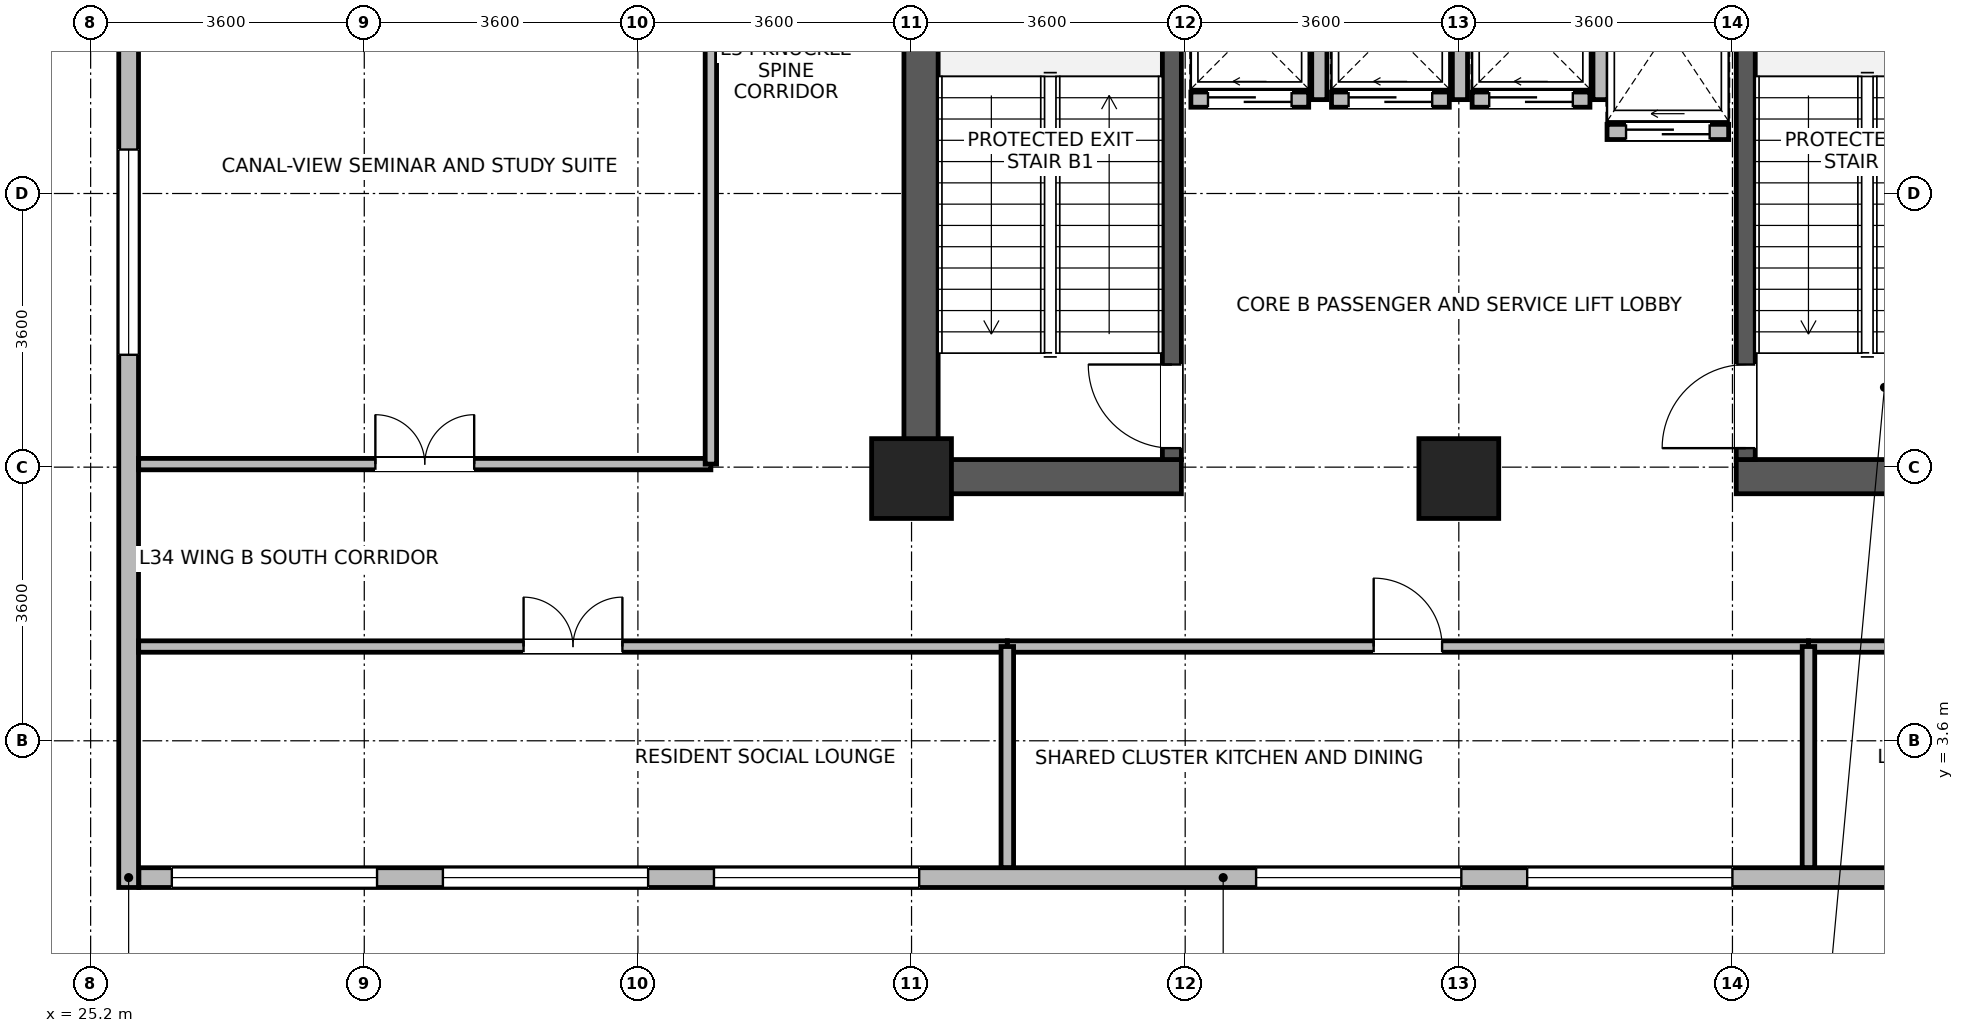
"""IFC4 building model, lengths in metres.
Left out: names, types, materials, properties, quantities, classifications, styles, units other than length and angle.
Written with IfcOpenShell. Run it as: python <this file> out.ifc"""

import sys

from ifc_helpers import new_model, si_unit, direction, frame, frame_2d, origin, origin_2d, place, context, subcontext, project, spatial, rectangle, extrude, source, transform, mapped, element, fill, save


model = new_model("IFC4")
c1 = context("Model", 3, precision=1e-05, world=origin(), true_north=direction((0.0, 1.0)))
c2 = subcontext(c1, "Body", "Model", "MODEL_VIEW")
j1 = project(units=[si_unit("LENGTHUNIT", "METRE"), si_unit("PLANEANGLEUNIT", "RADIAN")], contexts=[c1])
p1 = place(None, origin())
s1 = spatial("IfcSite", under=j1, at=p1, CompositionType="ELEMENT")
p2 = place(p1, origin())
s2 = spatial("IfcBuilding", under=s1, at=p2, CompositionType="ELEMENT")
p3 = place(p2, frame((0.0, 0.0, 135.6)))
s3 = spatial("IfcBuildingStorey", under=s2, at=p3, CompositionType="ELEMENT", Elevation=135.6)
p4 = place(p3, frame((36.125, 6.85, 0.0), z_axis=(0.0, 0.0, 1.0), x_axis=(0.0, 1.0, 0.0)))
e1 = element("IfcWall", 1, at=p4, inside=s3, PredefinedType="SHEAR", context=c2, shape_type="SweptSolid", body=[
    extrude(rectangle(XDim=7.9, YDim=0.45, at=frame_2d((3.95, 0.0))), origin(), (0.0, 0.0, 1.0), 4.36),
])
for number, where, z_axis, x_axis in (
    (2, (36.35, 7.075, 0.0), (0.0, 0.0, 1.0), (1.0, 0.0, 0.0)),
    (3, (46.85, 7.075, 0.0), (0.0, 0.0, 1.0), (1.0, 0.0, 0.0)),
):
    element("IfcWall", number, at=place(p3, frame(where, z_axis=z_axis, x_axis=x_axis)), inside=s3, PredefinedType="SHEAR", context=c2, shape_type="SweptSolid", body=[
        extrude(rectangle(XDim=3.2, YDim=0.45, at=frame_2d((1.6, 0.0))), origin(), (0.0, 0.0, 1.0), 4.36),
    ])
p5 = place(p3, frame((39.425, 7.3, 0.0), z_axis=(0.0, 0.0, 1.0), x_axis=(0.0, 1.0, 0.0)))
e4 = element("IfcWall", 4, at=p5, inside=s3, PredefinedType="SHEAR", context=c2, shape_type="SweptSolid", body=[
    extrude(rectangle(XDim=7.0, YDim=0.25, at=frame_2d((3.5, 0.0))), origin(), (0.0, 0.0, 1.0), 4.36),
])
p6 = place(p5, frame((0.15, 0.0, 0.0)))
e5 = element("IfcOpeningElement", 5, at=p6, cuts=e4, PredefinedType="OPENING", context=c2, shape_type="SweptSolid", body=[
    extrude(rectangle(XDim=1.1, YDim=2.08, at=frame_2d((0.55, 1.04))), frame((0.0, 0.135, 0.0), z_axis=(0.0, -1.0, 0.0), x_axis=(1.0, 0.0, 0.0)), (0.0, 0.0, 1.0), 0.27),
])
p7 = place(p3, frame((46.975, 7.3, 0.0), z_axis=(0.0, 0.0, 1.0), x_axis=(0.0, 1.0, 0.0)))
e6 = element("IfcWall", 6, at=p7, inside=s3, PredefinedType="SHEAR", context=c2, shape_type="SweptSolid", body=[
    extrude(rectangle(XDim=7.0, YDim=0.25, at=frame_2d((3.5, 0.0))), origin(), (0.0, 0.0, 1.0), 4.36),
])
p8 = place(p7, frame((0.15, 0.0, 0.0)))
e7 = element("IfcOpeningElement", 7, at=p8, cuts=e6, PredefinedType="OPENING", context=c2, shape_type="SweptSolid", body=[
    extrude(rectangle(XDim=1.1, YDim=2.08, at=frame_2d((0.55, 1.04))), frame((0.0, 0.135, 0.0), z_axis=(0.0, -1.0, 0.0), x_axis=(1.0, 0.0, 0.0)), (0.0, 0.0, 1.0), 0.27),
])
m1 = source(origin(), c2, "Body", "SweptSolid", [
    extrude(rectangle(XDim=1.05, YDim=1.05, at=origin_2d()), origin(), (0.0, 0.0, 1.0), 4.6),
])
for number, where, z_axis, x_axis in (
    (8, (36.0, 7.05, 0.0), (0.0, 0.0, 1.0), (1.0, 0.0, 0.0)),
    (9, (43.2, 7.05, 0.0), (0.0, 0.0, 1.0), (1.0, 0.0, 0.0)),
):
    element("IfcColumn", number, at=place(p3, frame(where, z_axis=z_axis, x_axis=x_axis)), inside=s3, PredefinedType="COLUMN", context=c2, shape_type="MappedRepresentation", body=[
        mapped(m1, transform((0.0, 0.0, 0.0), x_axis=(1.0, 0.0, 0.0), y_axis=(0.0, 1.0, 0.0), z_axis=(0.0, 0.0, 1.0), scale=1.0)),
    ])
p9 = place(p3, frame((54.365, 1.8, 0.0), z_axis=(0.0, 0.0, 1.0), x_axis=(-1.0, 0.0, 0.0)))
e10 = element("IfcWall", 10, at=p9, inside=s3, PredefinedType="STANDARD", context=c2, shape_type="SweptSolid", body=[
    extrude(rectangle(XDim=28.53, YDim=0.26, at=frame_2d((14.265, 0.0))), origin(), (0.0, 0.0, 1.0), 4.34),
])
p10 = place(p9, frame((0.433, 0.0, 0.85)))
e11 = element("IfcOpeningElement", 11, at=p10, cuts=e10, PredefinedType="OPENING", context=c2, shape_type="SweptSolid", body=[
    extrude(rectangle(XDim=2.7, YDim=2.05, at=frame_2d((1.35, 1.025))), frame((0.0, 0.14, 0.0), z_axis=(0.0, -1.0, 0.0), x_axis=(1.0, 0.0, 0.0)), (0.0, 0.0, 1.0), 0.28),
])
p11 = place(p9, frame((7.566, 0.0, 0.85)))
e12 = element("IfcOpeningElement", 12, at=p11, cuts=e10, PredefinedType="OPENING", context=c2, shape_type="SweptSolid", body=[
    extrude(rectangle(XDim=2.7, YDim=2.05, at=frame_2d((1.35, 1.025))), frame((0.0, 0.14, 0.0), z_axis=(0.0, -1.0, 0.0), x_axis=(1.0, 0.0, 0.0)), (0.0, 0.0, 1.0), 0.28),
])
p12 = place(p9, frame((11.132, 0.0, 0.85)))
e13 = element("IfcOpeningElement", 13, at=p12, cuts=e10, PredefinedType="OPENING", context=c2, shape_type="SweptSolid", body=[
    extrude(rectangle(XDim=2.7, YDim=2.05, at=frame_2d((1.35, 1.025))), frame((0.0, 0.14, 0.0), z_axis=(0.0, -1.0, 0.0), x_axis=(1.0, 0.0, 0.0)), (0.0, 0.0, 1.0), 0.28),
])
p13 = place(p9, frame((18.264, 0.0, 0.85)))
e14 = element("IfcOpeningElement", 14, at=p13, cuts=e10, PredefinedType="OPENING", context=c2, shape_type="SweptSolid", body=[
    extrude(rectangle(XDim=2.7, YDim=2.05, at=frame_2d((1.35, 1.025))), frame((0.0, 0.14, 0.0), z_axis=(0.0, -1.0, 0.0), x_axis=(1.0, 0.0, 0.0)), (0.0, 0.0, 1.0), 0.28),
])
p14 = place(p9, frame((21.831, 0.0, 0.85)))
e15 = element("IfcOpeningElement", 15, at=p14, cuts=e10, PredefinedType="OPENING", context=c2, shape_type="SweptSolid", body=[
    extrude(rectangle(XDim=2.7, YDim=2.05, at=frame_2d((1.35, 1.025))), frame((0.0, 0.14, 0.0), z_axis=(0.0, -1.0, 0.0), x_axis=(1.0, 0.0, 0.0)), (0.0, 0.0, 1.0), 0.28),
])
p15 = place(p9, frame((25.397, 0.0, 0.85)))
e16 = element("IfcOpeningElement", 16, at=p15, cuts=e10, PredefinedType="OPENING", context=c2, shape_type="SweptSolid", body=[
    extrude(rectangle(XDim=2.7, YDim=2.05, at=frame_2d((1.35, 1.025))), frame((0.0, 0.14, 0.0), z_axis=(0.0, -1.0, 0.0), x_axis=(1.0, 0.0, 0.0)), (0.0, 0.0, 1.0), 0.28),
])
p16 = place(p3, frame((25.7, 1.67, 0.0), z_axis=(0.0, 0.0, 1.0), x_axis=(0.0, 1.0, 0.0)))
e17 = element("IfcWall", 17, at=p16, inside=s3, PredefinedType="STANDARD", context=c2, shape_type="SweptSolid", body=[
    extrude(rectangle(XDim=20.06, YDim=0.26, at=frame_2d((10.03, 0.0))), origin(), (0.0, 0.0, 1.0), 4.34),
])
p17 = place(p16, frame((7.008, 0.0, 0.85)))
e18 = element("IfcOpeningElement", 18, at=p17, cuts=e17, PredefinedType="OPENING", context=c2, shape_type="SweptSolid", body=[
    extrude(rectangle(XDim=2.7, YDim=2.05, at=frame_2d((1.35, 1.025))), frame((0.0, 0.14, 0.0), z_axis=(0.0, -1.0, 0.0), x_axis=(1.0, 0.0, 0.0)), (0.0, 0.0, 1.0), 0.28),
])
p18 = place(p16, frame((13.695, 0.0, 0.85)))
e19 = element("IfcOpeningElement", 19, at=p18, cuts=e17, PredefinedType="OPENING", context=c2, shape_type="SweptSolid", body=[
    extrude(rectangle(XDim=2.7, YDim=2.05, at=frame_2d((1.35, 1.025))), frame((0.0, 0.14, 0.0), z_axis=(0.0, -1.0, 0.0), x_axis=(1.0, 0.0, 0.0)), (0.0, 0.0, 1.0), 0.28),
])
p19 = place(p3, frame((39.675, 12.035, 0.0), z_axis=(0.0, 0.0, 1.0), x_axis=(1.0, 0.0, 0.0)))
e20 = element("IfcWall", 20, at=p19, inside=s3, PredefinedType="PARTITIONING", context=c2, shape_type="SweptSolid", body=[
    extrude(rectangle(XDim=1.55, YDim=0.2, at=frame_2d((0.775, 0.0))), origin(), (0.0, 0.0, 1.0), 4.34),
])
p20 = place(p19, frame((0.225, 0.0, 0.0)))
e21 = element("IfcOpeningElement", 21, at=p20, cuts=e20, PredefinedType="OPENING", context=c2, shape_type="SweptSolid", body=[
    extrude(rectangle(XDim=1.1, YDim=2.12, at=frame_2d((0.55, 1.06))), frame((0.0, 0.11, 0.0), z_axis=(0.0, -1.0, 0.0), x_axis=(1.0, 0.0, 0.0)), (0.0, 0.0, 1.0), 0.22),
])
p21 = place(p3, frame((41.365, 12.035, 0.0), z_axis=(0.0, 0.0, 1.0), x_axis=(0.0, 1.0, 0.0)))
e22 = element("IfcWall", 22, at=p21, inside=s3, PredefinedType="PARTITIONING", context=c2, shape_type="SweptSolid", body=[
    extrude(rectangle(XDim=1.83, YDim=0.2, at=frame_2d((0.915, 0.0))), origin(), (0.0, 0.0, 1.0), 4.34),
])
p22 = place(p3, frame((41.525, 12.035, 0.0), z_axis=(0.0, 0.0, 1.0), x_axis=(1.0, 0.0, 0.0)))
e23 = element("IfcWall", 23, at=p22, inside=s3, PredefinedType="PARTITIONING", context=c2, shape_type="SweptSolid", body=[
    extrude(rectangle(XDim=1.55, YDim=0.2, at=frame_2d((0.775, 0.0))), origin(), (0.0, 0.0, 1.0), 4.34),
])
p23 = place(p22, frame((0.225, 0.0, 0.0)))
e24 = element("IfcOpeningElement", 24, at=p23, cuts=e23, PredefinedType="OPENING", context=c2, shape_type="SweptSolid", body=[
    extrude(rectangle(XDim=1.1, YDim=2.12, at=frame_2d((0.55, 1.06))), frame((0.0, 0.11, 0.0), z_axis=(0.0, -1.0, 0.0), x_axis=(1.0, 0.0, 0.0)), (0.0, 0.0, 1.0), 0.22),
])
p24 = place(p3, frame((43.215, 12.035, 0.0), z_axis=(0.0, 0.0, 1.0), x_axis=(0.0, 1.0, 0.0)))
e25 = element("IfcWall", 25, at=p24, inside=s3, PredefinedType="PARTITIONING", context=c2, shape_type="SweptSolid", body=[
    extrude(rectangle(XDim=1.83, YDim=0.2, at=frame_2d((0.915, 0.0))), origin(), (0.0, 0.0, 1.0), 4.34),
])
p25 = place(p3, frame((43.375, 12.035, 0.0), z_axis=(0.0, 0.0, 1.0), x_axis=(1.0, 0.0, 0.0)))
e26 = element("IfcWall", 26, at=p25, inside=s3, PredefinedType="PARTITIONING", context=c2, shape_type="SweptSolid", body=[
    extrude(rectangle(XDim=1.55, YDim=0.2, at=frame_2d((0.775, 0.0))), origin(), (0.0, 0.0, 1.0), 4.34),
])
p26 = place(p25, frame((0.225, 0.0, 0.0)))
e27 = element("IfcOpeningElement", 27, at=p26, cuts=e26, PredefinedType="OPENING", context=c2, shape_type="SweptSolid", body=[
    extrude(rectangle(XDim=1.1, YDim=2.12, at=frame_2d((0.55, 1.06))), frame((0.0, 0.11, 0.0), z_axis=(0.0, -1.0, 0.0), x_axis=(1.0, 0.0, 0.0)), (0.0, 0.0, 1.0), 0.22),
])
p27 = place(p3, frame((45.065, 12.035, 0.0), z_axis=(0.0, 0.0, 1.0), x_axis=(0.0, 1.0, 0.0)))
e28 = element("IfcWall", 28, at=p27, inside=s3, PredefinedType="PARTITIONING", context=c2, shape_type="SweptSolid", body=[
    extrude(rectangle(XDim=1.83, YDim=0.2, at=frame_2d((0.915, 0.0))), origin(), (0.0, 0.0, 1.0), 4.34),
])
p28 = place(p3, frame((45.15, 11.61, 0.0), z_axis=(0.0, 0.0, 1.0), x_axis=(1.0, 0.0, 0.0)))
e29 = element("IfcWall", 29, at=p28, inside=s3, PredefinedType="PARTITIONING", context=c2, shape_type="SweptSolid", body=[
    extrude(rectangle(XDim=1.6, YDim=0.2, at=frame_2d((0.8, 0.0))), origin(), (0.0, 0.0, 1.0), 4.34),
])
p29 = place(p28, frame((0.25, 0.0, 0.0)))
e30 = element("IfcOpeningElement", 30, at=p29, cuts=e29, PredefinedType="OPENING", context=c2, shape_type="SweptSolid", body=[
    extrude(rectangle(XDim=1.1, YDim=2.12, at=frame_2d((0.55, 1.06))), frame((0.0, 0.11, 0.0), z_axis=(0.0, -1.0, 0.0), x_axis=(1.0, 0.0, 0.0)), (0.0, 0.0, 1.0), 0.22),
])
p30 = place(p3, frame((25.832, 4.84, 0.0), z_axis=(0.0, 0.0, 1.0), x_axis=(1.0, 0.0, 0.0)))
e31 = element("IfcWall", 31, at=p30, inside=s3, PredefinedType="PARTITIONING", context=c2, shape_type="SweptSolid", body=[
    extrude(rectangle(XDim=11.428, YDim=0.15, at=frame_2d((5.714, 0.0))), origin(), (0.0, 0.0, 1.0), 4.34),
])
p31 = place(p30, frame((5.064, 0.0, 0.0)))
e32 = element("IfcOpeningElement", 32, at=p31, cuts=e31, PredefinedType="OPENING", context=c2, shape_type="SweptSolid", body=[
    extrude(rectangle(XDim=1.3, YDim=2.12, at=frame_2d((0.65, 1.06))), frame((0.0, 0.085, 0.0), z_axis=(0.0, -1.0, 0.0), x_axis=(1.0, 0.0, 0.0)), (0.0, 0.0, 1.0), 0.17),
])
p32 = place(p3, frame((37.26, 4.84, 0.0), z_axis=(0.0, 0.0, 1.0), x_axis=(1.0, 0.0, 0.0)))
e33 = element("IfcWall", 33, at=p32, inside=s3, PredefinedType="PARTITIONING", context=c2, shape_type="SweptSolid", body=[
    extrude(rectangle(XDim=10.54, YDim=0.15, at=frame_2d((5.27, 0.0))), origin(), (0.0, 0.0, 1.0), 4.34),
])
p33 = place(p32, frame((4.82, 0.0, 0.0)))
e34 = element("IfcOpeningElement", 34, at=p33, cuts=e33, PredefinedType="OPENING", context=c2, shape_type="SweptSolid", body=[
    extrude(rectangle(XDim=0.9, YDim=2.08, at=frame_2d((0.45, 1.04))), frame((0.0, 0.085, 0.0), z_axis=(0.0, -1.0, 0.0), x_axis=(1.0, 0.0, 0.0)), (0.0, 0.0, 1.0), 0.17),
])
p34 = place(p3, frame((25.832, 7.24, 0.0), z_axis=(0.0, 0.0, 1.0), x_axis=(1.0, 0.0, 0.0)))
e35 = element("IfcWall", 35, at=p34, inside=s3, PredefinedType="PARTITIONING", context=c2, shape_type="SweptSolid", body=[
    extrude(rectangle(XDim=7.528, YDim=0.15, at=frame_2d((3.764, 0.0))), origin(), (0.0, 0.0, 1.0), 4.34),
])
p35 = place(p34, frame((3.114, 0.0, 0.0)))
e36 = element("IfcOpeningElement", 36, at=p35, cuts=e35, PredefinedType="OPENING", context=c2, shape_type="SweptSolid", body=[
    extrude(rectangle(XDim=1.3, YDim=2.12, at=frame_2d((0.65, 1.06))), frame((0.0, 0.085, 0.0), z_axis=(0.0, -1.0, 0.0), x_axis=(1.0, 0.0, 0.0)), (0.0, 0.0, 1.0), 0.17),
])
p36 = place(p3, frame((33.36, 7.24, 0.0), z_axis=(0.0, 0.0, 1.0), x_axis=(0.0, 1.0, 0.0)))
e37 = element("IfcWall", 37, at=p36, inside=s3, PredefinedType="PARTITIONING", context=c2, shape_type="SweptSolid", body=[
    extrude(rectangle(XDim=7.26, YDim=0.15, at=frame_2d((3.63, 0.0))), origin(), (0.0, 0.0, 1.0), 4.34),
])
p37 = place(p3, frame((47.8, 4.84, 0.0), z_axis=(0.0, 0.0, 1.0), x_axis=(1.0, 0.0, 0.0)))
e38 = element("IfcWall", 38, at=p37, inside=s3, PredefinedType="PARTITIONING", context=c2, shape_type="SweptSolid", body=[
    extrude(rectangle(XDim=6.568, YDim=0.15, at=frame_2d((3.284, 0.0))), origin(), (0.0, 0.0, 1.0), 4.34),
])
p38 = place(p37, frame((2.634, 0.0, 0.0)))
e39 = element("IfcOpeningElement", 39, at=p38, cuts=e38, PredefinedType="OPENING", context=c2, shape_type="SweptSolid", body=[
    extrude(rectangle(XDim=1.3, YDim=2.12, at=frame_2d((0.65, 1.06))), frame((0.0, 0.085, 0.0), z_axis=(0.0, -1.0, 0.0), x_axis=(1.0, 0.0, 0.0)), (0.0, 0.0, 1.0), 0.17),
])
for number, where, z_axis, x_axis in (
    (40, (37.26, 1.932, 0.0), (0.0, 0.0, 1.0), (0.0, 1.0, 0.0)),
    (41, (47.8, 1.932, 0.0), (0.0, 0.0, 1.0), (0.0, 1.0, 0.0)),
):
    element("IfcWall", number, at=place(p3, frame(where, z_axis=z_axis, x_axis=x_axis)), inside=s3, PredefinedType="PARTITIONING", context=c2, shape_type="SweptSolid", body=[
        extrude(rectangle(XDim=2.908, YDim=0.165, at=frame_2d((1.454, 0.0))), origin(), (0.0, 0.0, 1.0), 4.34),
    ])
p39 = place(p11, origin())
e42 = element("IfcWindow", 42, at=p39, inside=s3, PartitioningType="SINGLE_PANEL", PredefinedType="WINDOW", context=c2, shape_type="SweptSolid", body=[
    extrude(rectangle(XDim=2.7, YDim=2.05, at=frame_2d((1.35, 1.025))), frame((0.0, 0.03, 0.0), z_axis=(0.0, -1.0, 0.0), x_axis=(1.0, 0.0, 0.0)), (0.0, 0.0, 1.0), 0.06),
])
fill(e12, e42)
p40 = place(p12, origin())
e43 = element("IfcWindow", 43, at=p40, inside=s3, PartitioningType="SINGLE_PANEL", PredefinedType="WINDOW", context=c2, shape_type="SweptSolid", body=[
    extrude(rectangle(XDim=2.7, YDim=2.05, at=frame_2d((1.35, 1.025))), frame((0.0, 0.03, 0.0), z_axis=(0.0, -1.0, 0.0), x_axis=(1.0, 0.0, 0.0)), (0.0, 0.0, 1.0), 0.06),
])
fill(e13, e43)
p41 = place(p13, origin())
e44 = element("IfcWindow", 44, at=p41, inside=s3, PartitioningType="SINGLE_PANEL", PredefinedType="WINDOW", context=c2, shape_type="SweptSolid", body=[
    extrude(rectangle(XDim=2.7, YDim=2.05, at=frame_2d((1.35, 1.025))), frame((0.0, 0.03, 0.0), z_axis=(0.0, -1.0, 0.0), x_axis=(1.0, 0.0, 0.0)), (0.0, 0.0, 1.0), 0.06),
])
fill(e14, e44)
p42 = place(p14, origin())
e45 = element("IfcWindow", 45, at=p42, inside=s3, PartitioningType="SINGLE_PANEL", PredefinedType="WINDOW", context=c2, shape_type="SweptSolid", body=[
    extrude(rectangle(XDim=2.7, YDim=2.05, at=frame_2d((1.35, 1.025))), frame((0.0, 0.03, 0.0), z_axis=(0.0, -1.0, 0.0), x_axis=(1.0, 0.0, 0.0)), (0.0, 0.0, 1.0), 0.06),
])
fill(e15, e45)
p43 = place(p15, origin())
e46 = element("IfcWindow", 46, at=p43, inside=s3, PartitioningType="SINGLE_PANEL", PredefinedType="WINDOW", context=c2, shape_type="SweptSolid", body=[
    extrude(rectangle(XDim=2.7, YDim=2.05, at=frame_2d((1.35, 1.025))), frame((0.0, 0.03, 0.0), z_axis=(0.0, -1.0, 0.0), x_axis=(1.0, 0.0, 0.0)), (0.0, 0.0, 1.0), 0.06),
])
fill(e16, e46)
p44 = place(p17, origin())
e47 = element("IfcWindow", 47, at=p44, inside=s3, PartitioningType="SINGLE_PANEL", PredefinedType="WINDOW", context=c2, shape_type="SweptSolid", body=[
    extrude(rectangle(XDim=2.7, YDim=2.05, at=frame_2d((1.35, 1.025))), frame((0.0, 0.03, 0.0), z_axis=(0.0, -1.0, 0.0), x_axis=(1.0, 0.0, 0.0)), (0.0, 0.0, 1.0), 0.06),
])
fill(e18, e47)
p45 = place(p6, origin())
e48 = element("IfcDoor", 48, at=p45, inside=s3, OperationType="SINGLE_SWING_RIGHT", PredefinedType="DOOR", context=c2, shape_type="SweptSolid", body=[
    extrude(rectangle(XDim=1.1, YDim=2.08, at=frame_2d((0.55, 1.04))), frame((0.0, 0.025, 0.0), z_axis=(0.0, -1.0, 0.0), x_axis=(1.0, 0.0, 0.0)), (0.0, 0.0, 1.0), 0.05),
])
fill(e5, e48)
p46 = place(p8, origin())
e49 = element("IfcDoor", 49, at=p46, inside=s3, OperationType="SINGLE_SWING_LEFT", PredefinedType="DOOR", context=c2, shape_type="SweptSolid", body=[
    extrude(rectangle(XDim=1.1, YDim=2.08, at=frame_2d((0.55, 1.04))), frame((0.0, 0.025, 0.0), z_axis=(0.0, -1.0, 0.0), x_axis=(1.0, 0.0, 0.0)), (0.0, 0.0, 1.0), 0.05),
])
fill(e7, e49)
p47 = place(p20, origin())
e50 = element("IfcDoor", 50, at=p47, inside=s3, OperationType="SLIDING_TO_LEFT", PredefinedType="DOOR", context=c2, shape_type="SweptSolid", body=[
    extrude(rectangle(XDim=1.1, YDim=2.12, at=frame_2d((0.55, 1.06))), frame((0.0, 0.025, 0.0), z_axis=(0.0, -1.0, 0.0), x_axis=(1.0, 0.0, 0.0)), (0.0, 0.0, 1.0), 0.05),
])
fill(e21, e50)
p48 = place(p23, origin())
e51 = element("IfcDoor", 51, at=p48, inside=s3, OperationType="SLIDING_TO_LEFT", PredefinedType="DOOR", context=c2, shape_type="SweptSolid", body=[
    extrude(rectangle(XDim=1.1, YDim=2.12, at=frame_2d((0.55, 1.06))), frame((0.0, 0.025, 0.0), z_axis=(0.0, -1.0, 0.0), x_axis=(1.0, 0.0, 0.0)), (0.0, 0.0, 1.0), 0.05),
])
fill(e24, e51)
p49 = place(p26, origin())
e52 = element("IfcDoor", 52, at=p49, inside=s3, OperationType="SLIDING_TO_LEFT", PredefinedType="DOOR", context=c2, shape_type="SweptSolid", body=[
    extrude(rectangle(XDim=1.1, YDim=2.12, at=frame_2d((0.55, 1.06))), frame((0.0, 0.025, 0.0), z_axis=(0.0, -1.0, 0.0), x_axis=(1.0, 0.0, 0.0)), (0.0, 0.0, 1.0), 0.05),
])
fill(e27, e52)
p50 = place(p29, origin())
e53 = element("IfcDoor", 53, at=p50, inside=s3, OperationType="SLIDING_TO_LEFT", PredefinedType="DOOR", context=c2, shape_type="SweptSolid", body=[
    extrude(rectangle(XDim=1.1, YDim=2.12, at=frame_2d((0.55, 1.06))), frame((0.0, 0.025, 0.0), z_axis=(0.0, -1.0, 0.0), x_axis=(1.0, 0.0, 0.0)), (0.0, 0.0, 1.0), 0.05),
])
fill(e30, e53)
p51 = place(p31, origin())
e54 = element("IfcDoor", 54, at=p51, inside=s3, OperationType="DOUBLE_DOOR_SINGLE_SWING", PredefinedType="DOOR", context=c2, shape_type="SweptSolid", body=[
    extrude(rectangle(XDim=1.3, YDim=2.12, at=frame_2d((0.65, 1.06))), frame((0.0, 0.025, 0.0), z_axis=(0.0, -1.0, 0.0), x_axis=(1.0, 0.0, 0.0)), (0.0, 0.0, 1.0), 0.05),
])
fill(e32, e54)
p52 = place(p33, origin())
e55 = element("IfcDoor", 55, at=p52, inside=s3, OperationType="SINGLE_SWING_LEFT", PredefinedType="DOOR", context=c2, shape_type="SweptSolid", body=[
    extrude(rectangle(XDim=0.9, YDim=2.08, at=frame_2d((0.45, 1.04))), frame((0.0, 0.025, 0.0), z_axis=(0.0, -1.0, 0.0), x_axis=(1.0, 0.0, 0.0)), (0.0, 0.0, 1.0), 0.05),
])
fill(e34, e55)
p53 = place(p35, origin())
e56 = element("IfcDoor", 56, at=p53, inside=s3, OperationType="DOUBLE_DOOR_SINGLE_SWING", PredefinedType="DOOR", context=c2, shape_type="SweptSolid", body=[
    extrude(rectangle(XDim=1.3, YDim=2.12, at=frame_2d((0.65, 1.06))), frame((0.0, 0.025, 0.0), z_axis=(0.0, -1.0, 0.0), x_axis=(1.0, 0.0, 0.0)), (0.0, 0.0, 1.0), 0.05),
])
fill(e36, e56)
save(model, sys.argv[1])
